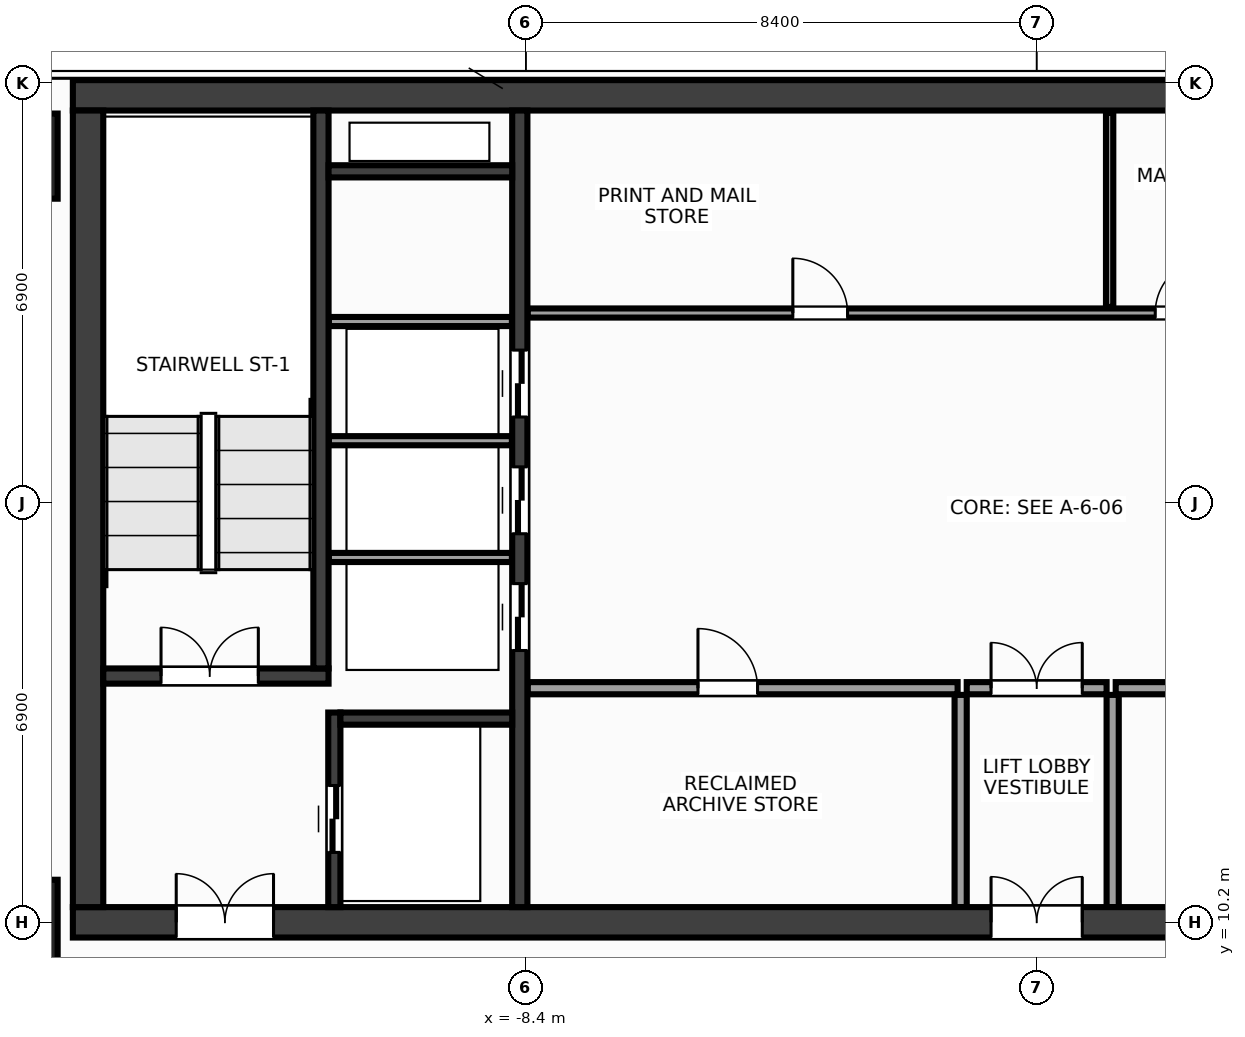
"""IFC4 building model, lengths in metres.
Left out: names, types, materials, properties, quantities, classifications, styles, units other than length and angle.
Written with IfcOpenShell. Run it as: python <this file> out.ifc"""

import sys

from ifc_helpers import new_model, si_unit, direction, frame, frame_2d, origin, origin_2d, place, context, subcontext, project, spatial, rectangle, extrude, source, transform, mapped, element, fill, save


model = new_model("IFC4")
c1 = context("Model", 3, precision=1e-05, world=origin(), true_north=direction((0.0, 1.0)))
c2 = subcontext(c1, "Body", "Model", "MODEL_VIEW")
j1 = project(units=[si_unit("LENGTHUNIT", "METRE"), si_unit("PLANEANGLEUNIT", "RADIAN")], contexts=[c1])
p1 = place(None, origin())
s1 = spatial("IfcSite", under=j1, at=p1, CompositionType="ELEMENT")
p2 = place(p1, origin())
s2 = spatial("IfcBuilding", under=s1, at=p2, CompositionType="ELEMENT")
p3 = place(p2, frame((0.0, 0.0, 243.2)))
s3 = spatial("IfcBuildingStorey", under=s2, at=p3, CompositionType="ELEMENT", Elevation=243.2)
m1 = source(origin(), c2, "Body", "SweptSolid", [
    extrude(rectangle(XDim=31.7, YDim=0.5, at=frame_2d((15.85, 0.0))), origin(), (0.0, 0.0, 1.0), 3.6),
])
p4 = place(p3, frame((-15.85, 23.8, 0.0), z_axis=(0.0, 0.0, 1.0), x_axis=(1.0, 0.0, 0.0)))
e1 = element("IfcWall", 1, at=p4, inside=s3, PredefinedType="SHEAR", context=c2, shape_type="MappedRepresentation", body=[
    mapped(m1, transform((0.0, 0.0, 0.0), x_axis=(1.0, 0.0, 0.0), y_axis=(0.0, 1.0, 0.0), z_axis=(0.0, 0.0, 1.0), scale=1.0)),
])
p5 = place(p3, frame((-15.85, 10.2, 0.0), z_axis=(0.0, 0.0, 1.0), x_axis=(1.0, 0.0, 0.0)))
e2 = element("IfcWall", 2, at=p5, inside=s3, PredefinedType="SHEAR", context=c2, shape_type="MappedRepresentation", body=[
    mapped(m1, transform((0.0, 0.0, 0.0), x_axis=(1.0, 0.0, 0.0), y_axis=(0.0, 1.0, 0.0), z_axis=(0.0, 0.0, 1.0), scale=1.0)),
])
p6 = place(p5, frame((1.7, 0.0, 0.0)))
e3 = element("IfcOpeningElement", 3, at=p6, cuts=e2, PredefinedType="OPENING", context=c2, shape_type="SweptSolid", body=[
    extrude(rectangle(XDim=1.6, YDim=2.15, at=frame_2d((0.8, 1.075))), frame((0.0, 0.262, 0.0), z_axis=(0.0, -1.0, 0.0), x_axis=(1.0, 0.0, 0.0)), (0.0, 0.0, 1.0), 0.524),
])
p7 = place(p5, frame((28.4, 0.0, 0.0)))
e4 = element("IfcOpeningElement", 4, at=p7, cuts=e2, PredefinedType="OPENING", context=c2, shape_type="SweptSolid", body=[
    extrude(rectangle(XDim=1.6, YDim=2.15, at=frame_2d((0.8, 1.075))), frame((0.0, 0.262, 0.0), z_axis=(0.0, -1.0, 0.0), x_axis=(1.0, 0.0, 0.0)), (0.0, 0.0, 1.0), 0.524),
])
p8 = place(p5, frame((15.1, 0.0, 0.0)))
e5 = element("IfcOpeningElement", 5, at=p8, cuts=e2, PredefinedType="OPENING", context=c2, shape_type="SweptSolid", body=[
    extrude(rectangle(XDim=1.5, YDim=2.2, at=frame_2d((0.75, 1.1))), frame((0.0, 0.262, 0.0), z_axis=(0.0, -1.0, 0.0), x_axis=(1.0, 0.0, 0.0)), (0.0, 0.0, 1.0), 0.524),
])
m2 = source(origin(), c2, "Body", "SweptSolid", [
    extrude(rectangle(XDim=13.1, YDim=0.5, at=frame_2d((6.55, 0.0))), origin(), (0.0, 0.0, 1.0), 3.6),
])
p9 = place(p3, frame((-15.6, 10.45, 0.0), z_axis=(0.0, 0.0, 1.0), x_axis=(0.0, 1.0, 0.0)))
e6 = element("IfcWall", 6, at=p9, inside=s3, PredefinedType="SHEAR", context=c2, shape_type="MappedRepresentation", body=[
    mapped(m2, transform((0.0, 0.0, 0.0), x_axis=(1.0, 0.0, 0.0), y_axis=(0.0, 1.0, 0.0), z_axis=(0.0, 0.0, 1.0), scale=1.0)),
])
m3 = source(origin(), c2, "Body", "SweptSolid", [
    extrude(rectangle(XDim=13.1, YDim=0.25, at=frame_2d((6.55, 0.0))), origin(), (0.0, 0.0, 1.0), 3.6),
])
p10 = place(p3, frame((-8.5, 10.45, 0.0), z_axis=(0.0, 0.0, 1.0), x_axis=(0.0, 1.0, 0.0)))
e7 = element("IfcWall", 7, at=p10, inside=s3, PredefinedType="SHEAR", context=c2, shape_type="MappedRepresentation", body=[
    mapped(m3, transform((0.0, 0.0, 0.0), x_axis=(1.0, 0.0, 0.0), y_axis=(0.0, 1.0, 0.0), z_axis=(0.0, 0.0, 1.0), scale=1.0)),
])
p11 = place(p10, frame((4.22, 0.0, 0.0)))
e8 = element("IfcOpeningElement", 8, at=p11, cuts=e7, PredefinedType="OPENING", context=c2, shape_type="SweptSolid", body=[
    extrude(rectangle(XDim=1.1, YDim=2.15, at=frame_2d((0.55, 1.075))), frame((0.0, 0.137, 0.0), z_axis=(0.0, -1.0, 0.0), x_axis=(1.0, 0.0, 0.0)), (0.0, 0.0, 1.0), 0.274),
])
p12 = place(p10, frame((6.14, 0.0, 0.0)))
e9 = element("IfcOpeningElement", 9, at=p12, cuts=e7, PredefinedType="OPENING", context=c2, shape_type="SweptSolid", body=[
    extrude(rectangle(XDim=1.1, YDim=2.15, at=frame_2d((0.55, 1.075))), frame((0.0, 0.137, 0.0), z_axis=(0.0, -1.0, 0.0), x_axis=(1.0, 0.0, 0.0)), (0.0, 0.0, 1.0), 0.274),
])
p13 = place(p10, frame((8.06, 0.0, 0.0)))
e10 = element("IfcOpeningElement", 10, at=p13, cuts=e7, PredefinedType="OPENING", context=c2, shape_type="SweptSolid", body=[
    extrude(rectangle(XDim=1.1, YDim=2.15, at=frame_2d((0.55, 1.075))), frame((0.0, 0.137, 0.0), z_axis=(0.0, -1.0, 0.0), x_axis=(1.0, 0.0, 0.0)), (0.0, 0.0, 1.0), 0.274),
])
m4 = source(origin(), c2, "Body", "SweptSolid", [
    extrude(rectangle(XDim=3.705, YDim=0.25, at=frame_2d((1.853, 0.0))), origin(), (0.0, 0.0, 1.0), 3.6),
])
p14 = place(p3, frame((-15.35, 14.25, 0.0), z_axis=(0.0, 0.0, 1.0), x_axis=(1.0, 0.0, 0.0)))
e11 = element("IfcWall", 11, at=p14, inside=s3, PredefinedType="SHEAR", context=c2, shape_type="MappedRepresentation", body=[
    mapped(m4, transform((0.0, 0.0, 0.0), x_axis=(1.0, 0.0, 0.0), y_axis=(0.0, 1.0, 0.0), z_axis=(0.0, 0.0, 1.0), scale=1.0)),
])
p15 = place(p14, frame((0.95, 0.0, 0.0)))
e12 = element("IfcOpeningElement", 12, at=p15, cuts=e11, PredefinedType="OPENING", context=c2, shape_type="SweptSolid", body=[
    extrude(rectangle(XDim=1.6, YDim=2.15, at=frame_2d((0.8, 1.075))), frame((0.0, 0.137, 0.0), z_axis=(0.0, -1.0, 0.0), x_axis=(1.0, 0.0, 0.0)), (0.0, 0.0, 1.0), 0.274),
])
m5 = source(origin(), c2, "Body", "SweptSolid", [
    extrude(rectangle(XDim=9.175, YDim=0.25, at=frame_2d((4.587, 0.0))), origin(), (0.0, 0.0, 1.0), 3.6),
])
p16 = place(p3, frame((-11.77, 14.375, 0.0), z_axis=(0.0, 0.0, 1.0), x_axis=(0.0, 1.0, 0.0)))
e13 = element("IfcWall", 13, at=p16, inside=s3, PredefinedType="SHEAR", context=c2, shape_type="MappedRepresentation", body=[
    mapped(m5, transform((0.0, 0.0, 0.0), x_axis=(1.0, 0.0, 0.0), y_axis=(0.0, 1.0, 0.0), z_axis=(0.0, 0.0, 1.0), scale=1.0)),
])
m6 = source(origin(), c2, "Body", "SweptSolid", [
    extrude(rectangle(XDim=3.2, YDim=0.2, at=frame_2d((1.6, 0.0))), origin(), (0.0, 0.0, 1.0), 3.6),
])
p17 = place(p3, frame((-11.55, 10.45, 0.0), z_axis=(0.0, 0.0, 1.0), x_axis=(0.0, 1.0, 0.0)))
e14 = element("IfcWall", 14, at=p17, inside=s3, PredefinedType="SHEAR", context=c2, shape_type="MappedRepresentation", body=[
    mapped(m6, transform((0.0, 0.0, 0.0), x_axis=(1.0, 0.0, 0.0), y_axis=(0.0, 1.0, 0.0), z_axis=(0.0, 0.0, 1.0), scale=1.0)),
])
p18 = place(p17, frame((0.9, 0.0, 0.0)))
e15 = element("IfcOpeningElement", 15, at=p18, cuts=e14, PredefinedType="OPENING", context=c2, shape_type="SweptSolid", body=[
    extrude(rectangle(XDim=1.1, YDim=2.15, at=frame_2d((0.55, 1.075))), frame((0.0, 0.112, 0.0), z_axis=(0.0, -1.0, 0.0), x_axis=(1.0, 0.0, 0.0)), (0.0, 0.0, 1.0), 0.224),
])
m7 = source(origin(), c2, "Body", "SweptSolid", [
    extrude(rectangle(XDim=2.825, YDim=0.2, at=frame_2d((1.413, 0.0))), origin(), (0.0, 0.0, 1.0), 3.6),
])
p19 = place(p3, frame((-11.45, 13.55, 0.0), z_axis=(0.0, 0.0, 1.0), x_axis=(1.0, 0.0, 0.0)))
e16 = element("IfcWall", 16, at=p19, inside=s3, PredefinedType="SHEAR", context=c2, shape_type="MappedRepresentation", body=[
    mapped(m7, transform((0.0, 0.0, 0.0), x_axis=(1.0, 0.0, 0.0), y_axis=(0.0, 1.0, 0.0), z_axis=(0.0, 0.0, 1.0), scale=1.0)),
])
m8 = source(origin(), c2, "Body", "SweptSolid", [
    extrude(rectangle(XDim=3.02, YDim=0.2, at=frame_2d((1.51, 0.0))), origin(), (0.0, 0.0, 1.0), 3.6),
])
p20 = place(p3, frame((-11.645, 22.55, 0.0), z_axis=(0.0, 0.0, 1.0), x_axis=(1.0, 0.0, 0.0)))
e17 = element("IfcWall", 17, at=p20, inside=s3, PredefinedType="SHEAR", context=c2, shape_type="MappedRepresentation", body=[
    mapped(m8, transform((0.0, 0.0, 0.0), x_axis=(1.0, 0.0, 0.0), y_axis=(0.0, 1.0, 0.0), z_axis=(0.0, 0.0, 1.0), scale=1.0)),
])
m9 = source(origin(), c2, "Body", "SweptSolid", [
    extrude(rectangle(XDim=1.4, YDim=1.4, at=origin_2d()), origin(), (0.0, 0.0, 1.0), 3.6),
])
for number, where, z_axis, x_axis in (
    (18, (-16.8, 10.2, 0.0), (0.0, 0.0, 1.0), (1.0, 0.0, 0.0)),
    (19, (-16.8, 22.8, 0.0), (0.0, 0.0, 1.0), (1.0, 0.0, 0.0)),
):
    element("IfcColumn", number, at=place(p3, frame(where, z_axis=z_axis, x_axis=x_axis)), inside=s3, PredefinedType="COLUMN", context=c2, shape_type="MappedRepresentation", body=[
        mapped(m9, transform((0.0, 0.0, 0.0), x_axis=(1.0, 0.0, 0.0), y_axis=(0.0, 1.0, 0.0), z_axis=(0.0, 0.0, 1.0), scale=1.0)),
    ])
m10 = source(origin(), c2, "Body", "SweptSolid", [
    extrude(rectangle(XDim=3.01, YDim=0.15, at=frame_2d((1.505, 0.0))), origin(), (0.0, 0.0, 1.0), 3.37),
])
for number, where, z_axis, x_axis in (
    (20, (-11.64, 16.2, 0.0), (0.0, 0.0, 1.0), (1.0, 0.0, 0.0)),
    (21, (-11.64, 18.12, 0.0), (0.0, 0.0, 1.0), (1.0, 0.0, 0.0)),
    (22, (-11.64, 20.08, 0.0), (0.0, 0.0, 1.0), (1.0, 0.0, 0.0)),
):
    element("IfcWall", number, at=place(p3, frame(where, z_axis=z_axis, x_axis=x_axis)), inside=s3, PredefinedType="PARTITIONING", context=c2, shape_type="MappedRepresentation", body=[
        mapped(m10, transform((0.0, 0.0, 0.0), x_axis=(1.0, 0.0, 0.0), y_axis=(0.0, 1.0, 0.0), z_axis=(0.0, 0.0, 1.0), scale=1.0)),
    ])
m11 = source(origin(), c2, "Body", "SweptSolid", [
    extrude(rectangle(XDim=7.07, YDim=0.2, at=frame_2d((3.535, 0.0))), origin(), (0.0, 0.0, 1.0), 3.37),
])
p21 = place(p3, frame((-8.37, 14.05, 0.0), z_axis=(0.0, 0.0, 1.0), x_axis=(1.0, 0.0, 0.0)))
e23 = element("IfcWall", 23, at=p21, inside=s3, PredefinedType="PARTITIONING", context=c2, shape_type="MappedRepresentation", body=[
    mapped(m11, transform((0.0, 0.0, 0.0), x_axis=(1.0, 0.0, 0.0), y_axis=(0.0, 1.0, 0.0), z_axis=(0.0, 0.0, 1.0), scale=1.0)),
])
p22 = place(p21, frame((2.8, 0.0, 0.0)))
e24 = element("IfcOpeningElement", 24, at=p22, cuts=e23, PredefinedType="OPENING", context=c2, shape_type="SweptSolid", body=[
    extrude(rectangle(XDim=0.98, YDim=2.15, at=frame_2d((0.49, 1.075))), frame((0.0, 0.112, 0.0), z_axis=(0.0, -1.0, 0.0), x_axis=(1.0, 0.0, 0.0)), (0.0, 0.0, 1.0), 0.224),
])
p23 = place(p3, frame((1.3, 14.05, 0.0), z_axis=(0.0, 0.0, 1.0), x_axis=(1.0, 0.0, 0.0)))
e25 = element("IfcWall", 25, at=p23, inside=s3, PredefinedType="PARTITIONING", context=c2, shape_type="MappedRepresentation", body=[
    mapped(m11, transform((0.0, 0.0, 0.0), x_axis=(1.0, 0.0, 0.0), y_axis=(0.0, 1.0, 0.0), z_axis=(0.0, 0.0, 1.0), scale=1.0)),
])
p24 = place(p23, frame((1.16, 0.0, 0.0)))
e26 = element("IfcOpeningElement", 26, at=p24, cuts=e25, PredefinedType="OPENING", context=c2, shape_type="SweptSolid", body=[
    extrude(rectangle(XDim=0.9, YDim=2.15, at=frame_2d((0.45, 1.075))), frame((0.0, 0.112, 0.0), z_axis=(0.0, -1.0, 0.0), x_axis=(1.0, 0.0, 0.0)), (0.0, 0.0, 1.0), 0.224),
])
p25 = place(p23, frame((4.61, 0.0, 0.0)))
e27 = element("IfcOpeningElement", 27, at=p25, cuts=e25, PredefinedType="OPENING", context=c2, shape_type="SweptSolid", body=[
    extrude(rectangle(XDim=0.9, YDim=2.15, at=frame_2d((0.45, 1.075))), frame((0.0, 0.112, 0.0), z_axis=(0.0, -1.0, 0.0), x_axis=(1.0, 0.0, 0.0)), (0.0, 0.0, 1.0), 0.224),
])
m12 = source(origin(), c2, "Body", "SweptSolid", [
    extrude(rectangle(XDim=3.49, YDim=0.2, at=frame_2d((1.745, 0.0))), origin(), (0.0, 0.0, 1.0), 3.37),
])
for number, where, z_axis, x_axis in (
    (28, (-1.25, 10.45, 0.0), (0.0, 0.0, 1.0), (0.0, 1.0, 0.0)),
    (29, (1.25, 10.45, 0.0), (0.0, 0.0, 1.0), (0.0, 1.0, 0.0)),
):
    element("IfcWall", number, at=place(p3, frame(where, z_axis=z_axis, x_axis=x_axis)), inside=s3, PredefinedType="PARTITIONING", context=c2, shape_type="MappedRepresentation", body=[
        mapped(m12, transform((0.0, 0.0, 0.0), x_axis=(1.0, 0.0, 0.0), y_axis=(0.0, 1.0, 0.0), z_axis=(0.0, 0.0, 1.0), scale=1.0)),
    ])
m13 = source(origin(), c2, "Body", "SweptSolid", [
    extrude(rectangle(XDim=2.3, YDim=0.2, at=frame_2d((1.15, 0.0))), origin(), (0.0, 0.0, 1.0), 3.37),
])
p26 = place(p3, frame((-1.15, 14.05, 0.0), z_axis=(0.0, 0.0, 1.0), x_axis=(1.0, 0.0, 0.0)))
e30 = element("IfcWall", 30, at=p26, inside=s3, PredefinedType="PARTITIONING", context=c2, shape_type="MappedRepresentation", body=[
    mapped(m13, transform((0.0, 0.0, 0.0), x_axis=(1.0, 0.0, 0.0), y_axis=(0.0, 1.0, 0.0), z_axis=(0.0, 0.0, 1.0), scale=1.0)),
])
p27 = place(p26, frame((0.4, 0.0, 0.0)))
e31 = element("IfcOpeningElement", 31, at=p27, cuts=e30, PredefinedType="OPENING", context=c2, shape_type="SweptSolid", body=[
    extrude(rectangle(XDim=1.5, YDim=2.2, at=frame_2d((0.75, 1.1))), frame((0.0, 0.112, 0.0), z_axis=(0.0, -1.0, 0.0), x_axis=(1.0, 0.0, 0.0)), (0.0, 0.0, 1.0), 0.224),
])
m14 = source(origin(), c2, "Body", "SweptSolid", [
    extrude(rectangle(XDim=14.59, YDim=0.15, at=frame_2d((7.295, 0.0))), origin(), (0.0, 0.0, 1.0), 3.37),
])
p28 = place(p3, frame((-8.37, 20.22, 0.0), z_axis=(0.0, 0.0, 1.0), x_axis=(1.0, 0.0, 0.0)))
e32 = element("IfcWall", 32, at=p28, inside=s3, PredefinedType="PARTITIONING", context=c2, shape_type="MappedRepresentation", body=[
    mapped(m14, transform((0.0, 0.0, 0.0), x_axis=(1.0, 0.0, 0.0), y_axis=(0.0, 1.0, 0.0), z_axis=(0.0, 0.0, 1.0), scale=1.0)),
])
p29 = place(p28, frame((4.36, 0.0, 0.0)))
e33 = element("IfcOpeningElement", 33, at=p29, cuts=e32, PredefinedType="OPENING", context=c2, shape_type="SweptSolid", body=[
    extrude(rectangle(XDim=0.9, YDim=2.15, at=frame_2d((0.45, 1.075))), frame((0.0, 0.087, 0.0), z_axis=(0.0, -1.0, 0.0), x_axis=(1.0, 0.0, 0.0)), (0.0, 0.0, 1.0), 0.174),
])
p30 = place(p28, frame((10.32, 0.0, 0.0)))
e34 = element("IfcOpeningElement", 34, at=p30, cuts=e32, PredefinedType="OPENING", context=c2, shape_type="SweptSolid", body=[
    extrude(rectangle(XDim=0.9, YDim=2.15, at=frame_2d((0.45, 1.075))), frame((0.0, 0.087, 0.0), z_axis=(0.0, -1.0, 0.0), x_axis=(1.0, 0.0, 0.0)), (0.0, 0.0, 1.0), 0.174),
])
p31 = place(p28, frame((12.77, 0.0, 0.0)))
e35 = element("IfcOpeningElement", 35, at=p31, cuts=e32, PredefinedType="OPENING", context=c2, shape_type="SweptSolid", body=[
    extrude(rectangle(XDim=0.9, YDim=2.15, at=frame_2d((0.45, 1.075))), frame((0.0, 0.087, 0.0), z_axis=(0.0, -1.0, 0.0), x_axis=(1.0, 0.0, 0.0)), (0.0, 0.0, 1.0), 0.174),
])
m15 = source(origin(), c2, "Body", "SweptSolid", [
    extrude(rectangle(XDim=3.19, YDim=0.12, at=frame_2d((1.595, 0.0))), origin(), (0.0, 0.0, 1.0), 3.37),
])
p32 = place(p3, frame((1.2, 20.32, 0.0), z_axis=(0.0, 0.0, 1.0), x_axis=(0.0, 1.0, 0.0)))
e36 = element("IfcWall", 36, at=p32, inside=s3, PredefinedType="PARTITIONING", context=c2, shape_type="MappedRepresentation", body=[
    mapped(m15, transform((0.0, 0.0, 0.0), x_axis=(1.0, 0.0, 0.0), y_axis=(0.0, 1.0, 0.0), z_axis=(0.0, 0.0, 1.0), scale=1.0)),
])
m16 = source(origin(), c2, "Body", "SweptSolid", [
    extrude(rectangle(XDim=1.6, YDim=2.15, at=frame_2d((0.8, 1.075))), frame((0.0, 0.025, 0.0), z_axis=(0.0, -1.0, 0.0), x_axis=(1.0, 0.0, 0.0)), (0.0, 0.0, 1.0), 0.05),
])
p33 = place(p15, origin())
e37 = element("IfcDoor", 37, at=p33, inside=s3, OperationType="DOUBLE_DOOR_SINGLE_SWING", PredefinedType="DOOR", context=c2, shape_type="MappedRepresentation", body=[
    mapped(m16, transform((0.0, 0.0, 0.0), x_axis=(1.0, 0.0, 0.0), y_axis=(0.0, 1.0, 0.0), z_axis=(0.0, 0.0, 1.0), scale=1.0)),
])
fill(e12, e37)
p34 = place(p6, origin())
e38 = element("IfcDoor", 38, at=p34, inside=s3, OperationType="DOUBLE_DOOR_SINGLE_SWING", PredefinedType="DOOR", context=c2, shape_type="MappedRepresentation", body=[
    mapped(m16, transform((0.0, 0.0, 0.0), x_axis=(1.0, 0.0, 0.0), y_axis=(0.0, 1.0, 0.0), z_axis=(0.0, 0.0, 1.0), scale=1.0)),
])
fill(e3, e38)
m17 = source(origin(), c2, "Body", "SweptSolid", [
    extrude(rectangle(XDim=1.1, YDim=2.15, at=frame_2d((0.55, 1.075))), frame((0.0, 0.025, 0.0), z_axis=(0.0, -1.0, 0.0), x_axis=(1.0, 0.0, 0.0)), (0.0, 0.0, 1.0), 0.05),
])
p35 = place(p18, origin())
e39 = element("IfcDoor", 39, at=p35, inside=s3, OperationType="DOUBLE_DOOR_SLIDING", PredefinedType="DOOR", context=c2, shape_type="MappedRepresentation", body=[
    mapped(m17, transform((0.0, 0.0, 0.0), x_axis=(1.0, 0.0, 0.0), y_axis=(0.0, 1.0, 0.0), z_axis=(0.0, 0.0, 1.0), scale=1.0)),
])
fill(e15, e39)
p36 = place(p11, origin())
e40 = element("IfcDoor", 40, at=p36, inside=s3, OperationType="DOUBLE_DOOR_SLIDING", PredefinedType="DOOR", context=c2, shape_type="MappedRepresentation", body=[
    mapped(m17, transform((0.0, 0.0, 0.0), x_axis=(1.0, 0.0, 0.0), y_axis=(0.0, 1.0, 0.0), z_axis=(0.0, 0.0, 1.0), scale=1.0)),
])
fill(e8, e40)
p37 = place(p12, origin())
e41 = element("IfcDoor", 41, at=p37, inside=s3, OperationType="DOUBLE_DOOR_SLIDING", PredefinedType="DOOR", context=c2, shape_type="MappedRepresentation", body=[
    mapped(m17, transform((0.0, 0.0, 0.0), x_axis=(1.0, 0.0, 0.0), y_axis=(0.0, 1.0, 0.0), z_axis=(0.0, 0.0, 1.0), scale=1.0)),
])
fill(e9, e41)
p38 = place(p13, origin())
e42 = element("IfcDoor", 42, at=p38, inside=s3, OperationType="DOUBLE_DOOR_SLIDING", PredefinedType="DOOR", context=c2, shape_type="MappedRepresentation", body=[
    mapped(m17, transform((0.0, 0.0, 0.0), x_axis=(1.0, 0.0, 0.0), y_axis=(0.0, 1.0, 0.0), z_axis=(0.0, 0.0, 1.0), scale=1.0)),
])
fill(e10, e42)
m18 = source(origin(), c2, "Body", "SweptSolid", [
    extrude(rectangle(XDim=0.98, YDim=2.15, at=frame_2d((0.49, 1.075))), frame((0.0, 0.025, 0.0), z_axis=(0.0, -1.0, 0.0), x_axis=(1.0, 0.0, 0.0)), (0.0, 0.0, 1.0), 0.05),
])
p39 = place(p22, origin())
e43 = element("IfcDoor", 43, at=p39, inside=s3, OperationType="SINGLE_SWING_LEFT", PredefinedType="DOOR", context=c2, shape_type="MappedRepresentation", body=[
    mapped(m18, transform((0.0, 0.0, 0.0), x_axis=(1.0, 0.0, 0.0), y_axis=(0.0, 1.0, 0.0), z_axis=(0.0, 0.0, 1.0), scale=1.0)),
])
fill(e24, e43)
m19 = source(origin(), c2, "Body", "SweptSolid", [
    extrude(rectangle(XDim=1.5, YDim=2.2, at=frame_2d((0.75, 1.1))), frame((0.0, 0.025, 0.0), z_axis=(0.0, -1.0, 0.0), x_axis=(1.0, 0.0, 0.0)), (0.0, 0.0, 1.0), 0.05),
])
p40 = place(p27, origin())
e44 = element("IfcDoor", 44, at=p40, inside=s3, OperationType="DOUBLE_DOOR_SINGLE_SWING", PredefinedType="DOOR", context=c2, shape_type="MappedRepresentation", body=[
    mapped(m19, transform((0.0, 0.0, 0.0), x_axis=(1.0, 0.0, 0.0), y_axis=(0.0, 1.0, 0.0), z_axis=(0.0, 0.0, 1.0), scale=1.0)),
])
fill(e31, e44)
p41 = place(p8, origin())
e45 = element("IfcDoor", 45, at=p41, inside=s3, OperationType="DOUBLE_DOOR_SINGLE_SWING", PredefinedType="DOOR", context=c2, shape_type="MappedRepresentation", body=[
    mapped(m19, transform((0.0, 0.0, 0.0), x_axis=(1.0, 0.0, 0.0), y_axis=(0.0, 1.0, 0.0), z_axis=(0.0, 0.0, 1.0), scale=1.0)),
])
fill(e5, e45)
m20 = source(origin(), c2, "Body", "SweptSolid", [
    extrude(rectangle(XDim=0.9, YDim=2.15, at=frame_2d((0.45, 1.075))), frame((0.0, 0.025, 0.0), z_axis=(0.0, -1.0, 0.0), x_axis=(1.0, 0.0, 0.0)), (0.0, 0.0, 1.0), 0.05),
])
p42 = place(p29, origin())
e46 = element("IfcDoor", 46, at=p42, inside=s3, OperationType="SINGLE_SWING_LEFT", PredefinedType="DOOR", context=c2, shape_type="MappedRepresentation", body=[
    mapped(m20, transform((0.0, 0.0, 0.0), x_axis=(1.0, 0.0, 0.0), y_axis=(0.0, 1.0, 0.0), z_axis=(0.0, 0.0, 1.0), scale=1.0)),
])
fill(e33, e46)
p43 = place(p30, origin())
e47 = element("IfcDoor", 47, at=p43, inside=s3, OperationType="SINGLE_SWING_RIGHT", PredefinedType="DOOR", context=c2, shape_type="MappedRepresentation", body=[
    mapped(m20, transform((0.0, 0.0, 0.0), x_axis=(1.0, 0.0, 0.0), y_axis=(0.0, 1.0, 0.0), z_axis=(0.0, 0.0, 1.0), scale=1.0)),
])
fill(e34, e47)
save(model, sys.argv[1])
